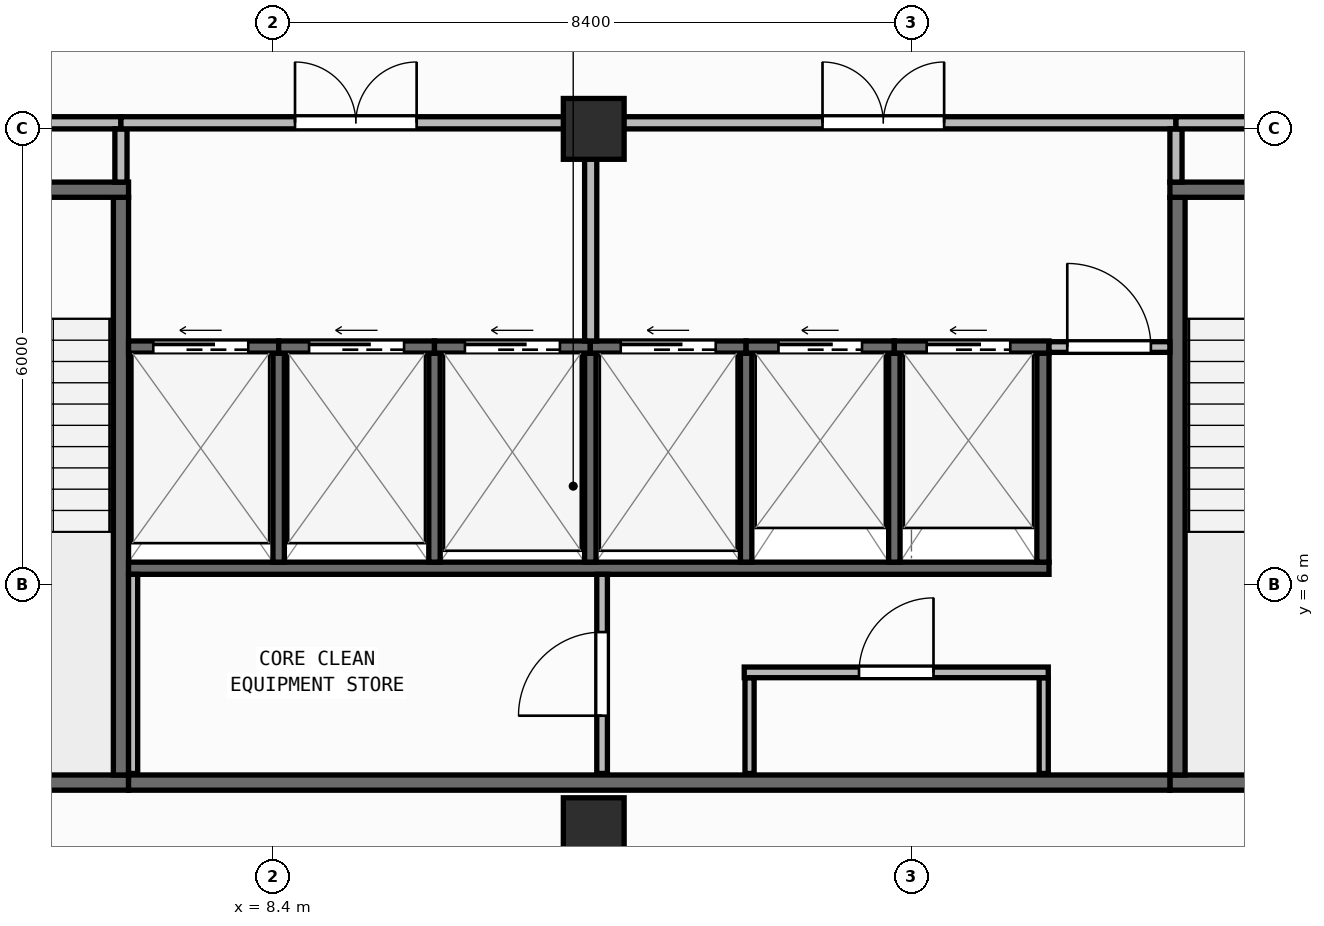
"""IFC4 building model, lengths in metres.
Left out: names, types, materials, properties, quantities, classifications, styles, units other than length and angle.
Written with IfcOpenShell. Run it as: python <this file> out.ifc"""

import sys

from ifc_helpers import new_model, si_unit, direction, frame, frame_2d, origin, origin_2d, place, context, subcontext, project, spatial, rectangle, extrude, element, fill, save


model = new_model("IFC4")
c1 = context("Model", 3, precision=1e-05, world=origin(), true_north=direction((0.0, 1.0)))
c2 = subcontext(c1, "Body", "Model", "MODEL_VIEW")
j1 = project(units=[si_unit("LENGTHUNIT", "METRE"), si_unit("PLANEANGLEUNIT", "RADIAN")], contexts=[c1])
p1 = place(None, origin())
s1 = spatial("IfcSite", under=j1, at=p1, CompositionType="ELEMENT")
p2 = place(p1, origin())
s2 = spatial("IfcBuilding", under=s1, at=p2, CompositionType="ELEMENT")
p3 = place(p2, frame((0.0, 0.0, 240.75)))
s3 = spatial("IfcBuildingStorey", under=s2, at=p3, CompositionType="ELEMENT", Elevation=240.75)
for number, where, z_axis, x_axis in (
    (1, (12.62, 2.8, 0.0), (0.0, 0.0, 1.0), (1.0, 0.0, 0.0)),
    (2, (12.62, 12.0, 0.0), (0.0, 0.0, 1.0), (1.0, 0.0, 0.0)),
):
    element("IfcColumn", number, at=place(p3, frame(where, z_axis=z_axis, x_axis=x_axis)), inside=s3, PredefinedType="COLUMN", context=c2, shape_type="SweptSolid", body=[
        extrude(rectangle(XDim=0.8, YDim=0.8, at=origin_2d()), origin(), (0.0, 0.0, 1.0), 3.95),
    ])
p4 = place(p3, frame((2.66, 0.174, 0.0), z_axis=(0.0, 0.0, 1.0), x_axis=(0.996611813627, 0.082248969229, 0.0)))
e3 = element("IfcWall", 3, at=p4, inside=s3, PredefinedType="STANDARD", context=c2, shape_type="SweptSolid", body=[
    extrude(rectangle(XDim=41.019, YDim=0.26, at=frame_2d((20.51, 0.0))), origin(), (0.0, 0.0, 1.0), 3.71),
])
p5 = place(p4, frame((19.31, 0.0, 0.9)))
e4 = element("IfcOpeningElement", 4, at=p5, cuts=e3, PredefinedType="OPENING", context=c2, shape_type="SweptSolid", body=[
    extrude(rectangle(XDim=2.4, YDim=1.65, at=frame_2d((1.2, 0.825))), frame((0.0, 0.14, 0.0), z_axis=(0.0, -1.0, 0.0), x_axis=(1.0, 0.0, 0.0)), (0.0, 0.0, 1.0), 0.28),
])
p6 = place(p3, frame((2.8, 3.4, 0.0), z_axis=(0.0, 0.0, 1.0), x_axis=(1.0, 0.0, 0.0)))
e5 = element("IfcWall", 5, at=p6, inside=s3, PredefinedType="SHEAR", context=c2, shape_type="SweptSolid", body=[
    extrude(rectangle(XDim=3.7, YDim=0.2, at=frame_2d((1.85, 0.0))), origin(), (0.0, 0.0, 1.0), 3.71),
])
p7 = place(p3, frame((6.4, 3.5, 0.0), z_axis=(0.0, 0.0, 1.0), x_axis=(0.0, 1.0, 0.0)))
e6 = element("IfcWall", 6, at=p7, inside=s3, PredefinedType="SHEAR", context=c2, shape_type="SweptSolid", body=[
    extrude(rectangle(XDim=7.6, YDim=0.2, at=frame_2d((3.8, 0.0))), origin(), (0.0, 0.0, 1.0), 3.71),
])
p8 = place(p3, frame((2.8, 11.2, 0.0), z_axis=(0.0, 0.0, 1.0), x_axis=(1.0, 0.0, 0.0)))
e7 = element("IfcWall", 7, at=p8, inside=s3, PredefinedType="SHEAR", context=c2, shape_type="SweptSolid", body=[
    extrude(rectangle(XDim=3.7, YDim=0.2, at=frame_2d((1.85, 0.0))), origin(), (0.0, 0.0, 1.0), 3.71),
])
p9 = place(p8, frame((1.2, 0.0, 0.0)))
e8 = element("IfcOpeningElement", 8, at=p9, cuts=e7, PredefinedType="OPENING", context=c2, shape_type="SweptSolid", body=[
    extrude(rectangle(XDim=1.3, YDim=2.15, at=frame_2d((0.65, 1.075))), frame((0.0, 0.11, 0.0), z_axis=(0.0, -1.0, 0.0), x_axis=(1.0, 0.0, 0.0)), (0.0, 0.0, 1.0), 0.22),
])
p10 = place(p3, frame((20.2, 3.4, 0.0), z_axis=(0.0, 0.0, 1.0), x_axis=(1.0, 0.0, 0.0)))
e9 = element("IfcWall", 9, at=p10, inside=s3, PredefinedType="SHEAR", context=c2, shape_type="SweptSolid", body=[
    extrude(rectangle(XDim=3.7, YDim=0.2, at=frame_2d((1.85, 0.0))), origin(), (0.0, 0.0, 1.0), 3.71),
])
p11 = place(p3, frame((20.3, 3.5, 0.0), z_axis=(0.0, 0.0, 1.0), x_axis=(0.0, 1.0, 0.0)))
e10 = element("IfcWall", 10, at=p11, inside=s3, PredefinedType="SHEAR", context=c2, shape_type="SweptSolid", body=[
    extrude(rectangle(XDim=7.6, YDim=0.2, at=frame_2d((3.8, 0.0))), origin(), (0.0, 0.0, 1.0), 3.71),
])
p12 = place(p3, frame((20.2, 11.2, 0.0), z_axis=(0.0, 0.0, 1.0), x_axis=(1.0, 0.0, 0.0)))
e11 = element("IfcWall", 11, at=p12, inside=s3, PredefinedType="SHEAR", context=c2, shape_type="SweptSolid", body=[
    extrude(rectangle(XDim=3.7, YDim=0.2, at=frame_2d((1.85, 0.0))), origin(), (0.0, 0.0, 1.0), 3.71),
])
p13 = place(p12, frame((1.2, 0.0, 0.0)))
e12 = element("IfcOpeningElement", 12, at=p13, cuts=e11, PredefinedType="OPENING", context=c2, shape_type="SweptSolid", body=[
    extrude(rectangle(XDim=1.3, YDim=2.15, at=frame_2d((0.65, 1.075))), frame((0.0, 0.11, 0.0), z_axis=(0.0, -1.0, 0.0), x_axis=(1.0, 0.0, 0.0)), (0.0, 0.0, 1.0), 0.22),
])
p14 = place(p3, frame((6.5, 3.4, 0.0), z_axis=(0.0, 0.0, 1.0), x_axis=(1.0, 0.0, 0.0)))
e13 = element("IfcWall", 13, at=p14, inside=s3, PredefinedType="SHEAR", context=c2, shape_type="SweptSolid", body=[
    extrude(rectangle(XDim=13.7, YDim=0.2, at=frame_2d((6.85, 0.0))), origin(), (0.0, 0.0, 1.0), 3.71),
])
p15 = place(p3, frame((6.5, 6.22, 0.0), z_axis=(0.0, 0.0, 1.0), x_axis=(1.0, 0.0, 0.0)))
e14 = element("IfcWall", 14, at=p15, inside=s3, PredefinedType="SHEAR", context=c2, shape_type="SweptSolid", body=[
    extrude(rectangle(XDim=12.11, YDim=0.16, at=frame_2d((6.055, 0.0))), origin(), (0.0, 0.0, 1.0), 3.71),
])
p16 = place(p3, frame((18.53, 6.3, 0.0), z_axis=(0.0, 0.0, 1.0), x_axis=(0.0, 1.0, 0.0)))
e15 = element("IfcWall", 15, at=p16, inside=s3, PredefinedType="SHEAR", context=c2, shape_type="SweptSolid", body=[
    extrude(rectangle(XDim=2.75, YDim=0.16, at=frame_2d((1.375, 0.0))), origin(), (0.0, 0.0, 1.0), 3.71),
])
for number, where, z_axis, x_axis in (
    (16, (8.475, 6.3, 0.0), (0.0, 0.0, 1.0), (0.0, 1.0, 0.0)),
    (17, (10.525, 6.3, 0.0), (0.0, 0.0, 1.0), (0.0, 1.0, 0.0)),
    (18, (12.575, 6.3, 0.0), (0.0, 0.0, 1.0), (0.0, 1.0, 0.0)),
    (19, (14.625, 6.3, 0.0), (0.0, 0.0, 1.0), (0.0, 1.0, 0.0)),
    (20, (16.575, 6.3, 0.0), (0.0, 0.0, 1.0), (0.0, 1.0, 0.0)),
):
    element("IfcWall", number, at=place(p3, frame(where, z_axis=z_axis, x_axis=x_axis)), inside=s3, PredefinedType="SHEAR", context=c2, shape_type="SweptSolid", body=[
        extrude(rectangle(XDim=2.75, YDim=0.15, at=frame_2d((1.375, 0.0))), origin(), (0.0, 0.0, 1.0), 3.71),
    ])
p17 = place(p3, frame((6.5, 9.13, 0.0), z_axis=(0.0, 0.0, 1.0), x_axis=(1.0, 0.0, 0.0)))
e21 = element("IfcWall", 21, at=p17, inside=s3, PredefinedType="SHEAR", context=c2, shape_type="SweptSolid", body=[
    extrude(rectangle(XDim=1.975, YDim=0.16, at=frame_2d((0.988, 0.0))), origin(), (0.0, 0.0, 1.0), 3.71),
])
p18 = place(p17, frame((0.325, 0.0, 0.0)))
e22 = element("IfcOpeningElement", 22, at=p18, cuts=e21, PredefinedType="OPENING", context=c2, shape_type="SweptSolid", body=[
    extrude(rectangle(XDim=1.25, YDim=2.15, at=frame_2d((0.625, 1.075))), frame((0.0, 0.09, 0.0), z_axis=(0.0, -1.0, 0.0), x_axis=(1.0, 0.0, 0.0)), (0.0, 0.0, 1.0), 0.18),
])
p19 = place(p3, frame((8.475, 9.13, 0.0), z_axis=(0.0, 0.0, 1.0), x_axis=(1.0, 0.0, 0.0)))
e23 = element("IfcWall", 23, at=p19, inside=s3, PredefinedType="SHEAR", context=c2, shape_type="SweptSolid", body=[
    extrude(rectangle(XDim=2.05, YDim=0.16, at=frame_2d((1.025, 0.0))), origin(), (0.0, 0.0, 1.0), 3.71),
])
p20 = place(p19, frame((0.4, 0.0, 0.0)))
e24 = element("IfcOpeningElement", 24, at=p20, cuts=e23, PredefinedType="OPENING", context=c2, shape_type="SweptSolid", body=[
    extrude(rectangle(XDim=1.25, YDim=2.15, at=frame_2d((0.625, 1.075))), frame((0.0, 0.09, 0.0), z_axis=(0.0, -1.0, 0.0), x_axis=(1.0, 0.0, 0.0)), (0.0, 0.0, 1.0), 0.18),
])
p21 = place(p3, frame((10.525, 9.13, 0.0), z_axis=(0.0, 0.0, 1.0), x_axis=(1.0, 0.0, 0.0)))
e25 = element("IfcWall", 25, at=p21, inside=s3, PredefinedType="SHEAR", context=c2, shape_type="SweptSolid", body=[
    extrude(rectangle(XDim=2.05, YDim=0.16, at=frame_2d((1.025, 0.0))), origin(), (0.0, 0.0, 1.0), 3.71),
])
p22 = place(p21, frame((0.4, 0.0, 0.0)))
e26 = element("IfcOpeningElement", 26, at=p22, cuts=e25, PredefinedType="OPENING", context=c2, shape_type="SweptSolid", body=[
    extrude(rectangle(XDim=1.25, YDim=2.15, at=frame_2d((0.625, 1.075))), frame((0.0, 0.09, 0.0), z_axis=(0.0, -1.0, 0.0), x_axis=(1.0, 0.0, 0.0)), (0.0, 0.0, 1.0), 0.18),
])
p23 = place(p3, frame((12.575, 9.13, 0.0), z_axis=(0.0, 0.0, 1.0), x_axis=(1.0, 0.0, 0.0)))
e27 = element("IfcWall", 27, at=p23, inside=s3, PredefinedType="SHEAR", context=c2, shape_type="SweptSolid", body=[
    extrude(rectangle(XDim=2.05, YDim=0.16, at=frame_2d((1.025, 0.0))), origin(), (0.0, 0.0, 1.0), 3.71),
])
p24 = place(p23, frame((0.4, 0.0, 0.0)))
e28 = element("IfcOpeningElement", 28, at=p24, cuts=e27, PredefinedType="OPENING", context=c2, shape_type="SweptSolid", body=[
    extrude(rectangle(XDim=1.25, YDim=2.15, at=frame_2d((0.625, 1.075))), frame((0.0, 0.09, 0.0), z_axis=(0.0, -1.0, 0.0), x_axis=(1.0, 0.0, 0.0)), (0.0, 0.0, 1.0), 0.18),
])
p25 = place(p3, frame((14.625, 9.13, 0.0), z_axis=(0.0, 0.0, 1.0), x_axis=(1.0, 0.0, 0.0)))
e29 = element("IfcWall", 29, at=p25, inside=s3, PredefinedType="SHEAR", context=c2, shape_type="SweptSolid", body=[
    extrude(rectangle(XDim=1.95, YDim=0.16, at=frame_2d((0.975, 0.0))), origin(), (0.0, 0.0, 1.0), 3.71),
])
p26 = place(p25, frame((0.425, 0.0, 0.0)))
e30 = element("IfcOpeningElement", 30, at=p26, cuts=e29, PredefinedType="OPENING", context=c2, shape_type="SweptSolid", body=[
    extrude(rectangle(XDim=1.1, YDim=2.15, at=frame_2d((0.55, 1.075))), frame((0.0, 0.09, 0.0), z_axis=(0.0, -1.0, 0.0), x_axis=(1.0, 0.0, 0.0)), (0.0, 0.0, 1.0), 0.18),
])
p27 = place(p3, frame((16.575, 9.13, 0.0), z_axis=(0.0, 0.0, 1.0), x_axis=(1.0, 0.0, 0.0)))
e31 = element("IfcWall", 31, at=p27, inside=s3, PredefinedType="SHEAR", context=c2, shape_type="SweptSolid", body=[
    extrude(rectangle(XDim=2.035, YDim=0.16, at=frame_2d((1.018, 0.0))), origin(), (0.0, 0.0, 1.0), 3.71),
])
p28 = place(p27, frame((0.425, 0.0, 0.0)))
e32 = element("IfcOpeningElement", 32, at=p28, cuts=e31, PredefinedType="OPENING", context=c2, shape_type="SweptSolid", body=[
    extrude(rectangle(XDim=1.1, YDim=2.15, at=frame_2d((0.55, 1.075))), frame((0.0, 0.09, 0.0), z_axis=(0.0, -1.0, 0.0), x_axis=(1.0, 0.0, 0.0)), (0.0, 0.0, 1.0), 0.18),
])
p29 = place(p3, frame((6.56, 3.52, 0.0), z_axis=(0.0, 0.0, 1.0), x_axis=(0.0, 1.0, 0.0)))
e33 = element("IfcWall", 33, at=p29, inside=s3, PredefinedType="PARTITIONING", context=c2, shape_type="SweptSolid", body=[
    extrude(rectangle(XDim=2.62, YDim=0.12, at=frame_2d((1.31, 0.0))), origin(), (0.0, 0.0, 1.0), 3.71),
])
p30 = place(p3, frame((12.73, 3.52, 0.0), z_axis=(0.0, 0.0, 1.0), x_axis=(0.0, 1.0, 0.0)))
e34 = element("IfcWall", 34, at=p30, inside=s3, PredefinedType="PARTITIONING", context=c2, shape_type="SweptSolid", body=[
    extrude(rectangle(XDim=2.62, YDim=0.14, at=frame_2d((1.31, 0.0))), origin(), (0.0, 0.0, 1.0), 3.71),
])
p31 = place(p30, frame((0.76, 0.0, 0.0)))
e35 = element("IfcOpeningElement", 35, at=p31, cuts=e34, PredefinedType="OPENING", context=c2, shape_type="SweptSolid", body=[
    extrude(rectangle(XDim=1.1, YDim=2.1, at=frame_2d((0.55, 1.05))), frame((0.0, 0.08, 0.0), z_axis=(0.0, -1.0, 0.0), x_axis=(1.0, 0.0, 0.0)), (0.0, 0.0, 1.0), 0.16),
])
for number, where, z_axis, x_axis in (
    (36, (14.67, 3.52, 0.0), (0.0, 0.0, 1.0), (0.0, 1.0, 0.0)),
    (37, (18.54, 3.52, 0.0), (0.0, 0.0, 1.0), (0.0, 1.0, 0.0)),
):
    element("IfcWall", number, at=place(p3, frame(where, z_axis=z_axis, x_axis=x_axis)), inside=s3, PredefinedType="PARTITIONING", context=c2, shape_type="SweptSolid", body=[
        extrude(rectangle(XDim=1.26, YDim=0.12, at=frame_2d((0.63, 0.0))), origin(), (0.0, 0.0, 1.0), 3.71),
    ])
p32 = place(p3, frame((14.6, 4.85, 0.0), z_axis=(0.0, 0.0, 1.0), x_axis=(1.0, 0.0, 0.0)))
e38 = element("IfcWall", 38, at=p32, inside=s3, PredefinedType="PARTITIONING", context=c2, shape_type="SweptSolid", body=[
    extrude(rectangle(XDim=4.0, YDim=0.14, at=frame_2d((2.0, 0.0))), origin(), (0.0, 0.0, 1.0), 3.71),
])
p33 = place(p32, frame((1.51, 0.0, 0.0)))
e39 = element("IfcOpeningElement", 39, at=p33, cuts=e38, PredefinedType="OPENING", context=c2, shape_type="SweptSolid", body=[
    extrude(rectangle(XDim=0.98, YDim=2.1, at=frame_2d((0.49, 1.05))), frame((0.0, 0.08, 0.0), z_axis=(0.0, -1.0, 0.0), x_axis=(1.0, 0.0, 0.0)), (0.0, 0.0, 1.0), 0.16),
])
p34 = place(p3, frame((18.61, 9.13, 0.0), z_axis=(0.0, 0.0, 1.0), x_axis=(1.0, 0.0, 0.0)))
e40 = element("IfcWall", 40, at=p34, inside=s3, PredefinedType="PARTITIONING", context=c2, shape_type="SweptSolid", body=[
    extrude(rectangle(XDim=1.59, YDim=0.14, at=frame_2d((0.795, 0.0))), origin(), (0.0, 0.0, 1.0), 3.71),
])
p35 = place(p34, frame((0.24, 0.0, 0.0)))
e41 = element("IfcOpeningElement", 41, at=p35, cuts=e40, PredefinedType="OPENING", context=c2, shape_type="SweptSolid", body=[
    extrude(rectangle(XDim=1.1, YDim=2.1, at=frame_2d((0.55, 1.05))), frame((0.0, 0.08, 0.0), z_axis=(0.0, -1.0, 0.0), x_axis=(1.0, 0.0, 0.0)), (0.0, 0.0, 1.0), 0.16),
])
p36 = place(p3, frame((2.8, 12.08, 0.0), z_axis=(0.0, 0.0, 1.0), x_axis=(1.0, 0.0, 0.0)))
e42 = element("IfcWall", 42, at=p36, inside=s3, PredefinedType="PARTITIONING", context=c2, shape_type="SweptSolid", body=[
    extrude(rectangle(XDim=3.6, YDim=0.16, at=frame_2d((1.8, 0.0))), origin(), (0.0, 0.0, 1.0), 3.157),
])
p37 = place(p36, frame((1.0, 0.0, 0.0)))
e43 = element("IfcOpeningElement", 43, at=p37, cuts=e42, PredefinedType="OPENING", context=c2, shape_type="SweptSolid", body=[
    extrude(rectangle(XDim=1.6, YDim=2.05, at=frame_2d((0.8, 1.025))), frame((0.0, 0.09, 0.0), z_axis=(0.0, -1.0, 0.0), x_axis=(1.0, 0.0, 0.0)), (0.0, 0.0, 1.0), 0.18),
])
p38 = place(p3, frame((6.4, 11.3, 0.0), z_axis=(0.0, 0.0, 1.0), x_axis=(0.0, 1.0, 0.0)))
e44 = element("IfcWall", 44, at=p38, inside=s3, PredefinedType="PARTITIONING", context=c2, shape_type="SweptSolid", body=[
    extrude(rectangle(XDim=0.7, YDim=0.16, at=frame_2d((0.35, 0.0))), origin(), (0.0, 0.0, 1.0), 3.71),
])
p39 = place(p3, frame((6.4, 12.08, 0.0), z_axis=(0.0, 0.0, 1.0), x_axis=(1.0, 0.0, 0.0)))
e45 = element("IfcWall", 45, at=p39, inside=s3, PredefinedType="PARTITIONING", context=c2, shape_type="SweptSolid", body=[
    extrude(rectangle(XDim=6.18, YDim=0.16, at=frame_2d((3.09, 0.0))), origin(), (0.0, 0.0, 1.0), 3.157),
])
p40 = place(p39, frame((2.29, 0.0, 0.0)))
e46 = element("IfcOpeningElement", 46, at=p40, cuts=e45, PredefinedType="OPENING", context=c2, shape_type="SweptSolid", body=[
    extrude(rectangle(XDim=1.6, YDim=2.05, at=frame_2d((0.8, 1.025))), frame((0.0, 0.09, 0.0), z_axis=(0.0, -1.0, 0.0), x_axis=(1.0, 0.0, 0.0)), (0.0, 0.0, 1.0), 0.18),
])
p41 = place(p3, frame((12.58, 9.21, 0.0), z_axis=(0.0, 0.0, 1.0), x_axis=(0.0, 1.0, 0.0)))
e47 = element("IfcWall", 47, at=p41, inside=s3, PredefinedType="PARTITIONING", context=c2, shape_type="SweptSolid", body=[
    extrude(rectangle(XDim=2.79, YDim=0.16, at=frame_2d((1.395, 0.0))), origin(), (0.0, 0.0, 1.0), 3.71),
])
p42 = place(p3, frame((12.58, 12.08, 0.0), z_axis=(0.0, 0.0, 1.0), x_axis=(1.0, 0.0, 0.0)))
e48 = element("IfcWall", 48, at=p42, inside=s3, PredefinedType="PARTITIONING", context=c2, shape_type="SweptSolid", body=[
    extrude(rectangle(XDim=7.7, YDim=0.16, at=frame_2d((3.85, 0.0))), origin(), (0.0, 0.0, 1.0), 3.157),
])
p43 = place(p42, frame((3.05, 0.0, 0.0)))
e49 = element("IfcOpeningElement", 49, at=p43, cuts=e48, PredefinedType="OPENING", context=c2, shape_type="SweptSolid", body=[
    extrude(rectangle(XDim=1.6, YDim=2.05, at=frame_2d((0.8, 1.025))), frame((0.0, 0.09, 0.0), z_axis=(0.0, -1.0, 0.0), x_axis=(1.0, 0.0, 0.0)), (0.0, 0.0, 1.0), 0.18),
])
p44 = place(p3, frame((20.28, 11.3, 0.0), z_axis=(0.0, 0.0, 1.0), x_axis=(0.0, 1.0, 0.0)))
e50 = element("IfcWall", 50, at=p44, inside=s3, PredefinedType="PARTITIONING", context=c2, shape_type="SweptSolid", body=[
    extrude(rectangle(XDim=0.7, YDim=0.16, at=frame_2d((0.35, 0.0))), origin(), (0.0, 0.0, 1.0), 3.71),
])
p45 = place(p3, frame((20.28, 12.08, 0.0), z_axis=(0.0, 0.0, 1.0), x_axis=(1.0, 0.0, 0.0)))
e51 = element("IfcWall", 51, at=p45, inside=s3, PredefinedType="PARTITIONING", context=c2, shape_type="SweptSolid", body=[
    extrude(rectangle(XDim=3.62, YDim=0.16, at=frame_2d((1.81, 0.0))), origin(), (0.0, 0.0, 1.0), 3.157),
])
p46 = place(p45, frame((1.01, 0.0, 0.0)))
e52 = element("IfcOpeningElement", 52, at=p46, cuts=e51, PredefinedType="OPENING", context=c2, shape_type="SweptSolid", body=[
    extrude(rectangle(XDim=1.6, YDim=2.05, at=frame_2d((0.8, 1.025))), frame((0.0, 0.09, 0.0), z_axis=(0.0, -1.0, 0.0), x_axis=(1.0, 0.0, 0.0)), (0.0, 0.0, 1.0), 0.18),
])
p47 = place(p18, origin())
e53 = element("IfcDoor", 53, at=p47, inside=s3, OperationType="SLIDING_TO_LEFT", PredefinedType="DOOR", context=c2, shape_type="SweptSolid", body=[
    extrude(rectangle(XDim=1.25, YDim=2.15, at=frame_2d((0.625, 1.075))), frame((0.0, 0.025, 0.0), z_axis=(0.0, -1.0, 0.0), x_axis=(1.0, 0.0, 0.0)), (0.0, 0.0, 1.0), 0.05),
])
fill(e22, e53)
p48 = place(p20, origin())
e54 = element("IfcDoor", 54, at=p48, inside=s3, OperationType="SLIDING_TO_LEFT", PredefinedType="DOOR", context=c2, shape_type="SweptSolid", body=[
    extrude(rectangle(XDim=1.25, YDim=2.15, at=frame_2d((0.625, 1.075))), frame((0.0, 0.025, 0.0), z_axis=(0.0, -1.0, 0.0), x_axis=(1.0, 0.0, 0.0)), (0.0, 0.0, 1.0), 0.05),
])
fill(e24, e54)
p49 = place(p22, origin())
e55 = element("IfcDoor", 55, at=p49, inside=s3, OperationType="SLIDING_TO_LEFT", PredefinedType="DOOR", context=c2, shape_type="SweptSolid", body=[
    extrude(rectangle(XDim=1.25, YDim=2.15, at=frame_2d((0.625, 1.075))), frame((0.0, 0.025, 0.0), z_axis=(0.0, -1.0, 0.0), x_axis=(1.0, 0.0, 0.0)), (0.0, 0.0, 1.0), 0.05),
])
fill(e26, e55)
p50 = place(p24, origin())
e56 = element("IfcDoor", 56, at=p50, inside=s3, OperationType="SLIDING_TO_LEFT", PredefinedType="DOOR", context=c2, shape_type="SweptSolid", body=[
    extrude(rectangle(XDim=1.25, YDim=2.15, at=frame_2d((0.625, 1.075))), frame((0.0, 0.025, 0.0), z_axis=(0.0, -1.0, 0.0), x_axis=(1.0, 0.0, 0.0)), (0.0, 0.0, 1.0), 0.05),
])
fill(e28, e56)
p51 = place(p26, origin())
e57 = element("IfcDoor", 57, at=p51, inside=s3, OperationType="SLIDING_TO_LEFT", PredefinedType="DOOR", context=c2, shape_type="SweptSolid", body=[
    extrude(rectangle(XDim=1.1, YDim=2.15, at=frame_2d((0.55, 1.075))), frame((0.0, 0.025, 0.0), z_axis=(0.0, -1.0, 0.0), x_axis=(1.0, 0.0, 0.0)), (0.0, 0.0, 1.0), 0.05),
])
fill(e30, e57)
p52 = place(p28, origin())
e58 = element("IfcDoor", 58, at=p52, inside=s3, OperationType="SLIDING_TO_LEFT", PredefinedType="DOOR", context=c2, shape_type="SweptSolid", body=[
    extrude(rectangle(XDim=1.1, YDim=2.15, at=frame_2d((0.55, 1.075))), frame((0.0, 0.025, 0.0), z_axis=(0.0, -1.0, 0.0), x_axis=(1.0, 0.0, 0.0)), (0.0, 0.0, 1.0), 0.05),
])
fill(e32, e58)
p53 = place(p31, origin())
e59 = element("IfcDoor", 59, at=p53, inside=s3, OperationType="SINGLE_SWING_LEFT", PredefinedType="DOOR", context=c2, shape_type="SweptSolid", body=[
    extrude(rectangle(XDim=1.1, YDim=2.1, at=frame_2d((0.55, 1.05))), frame((0.0, 0.025, 0.0), z_axis=(0.0, -1.0, 0.0), x_axis=(1.0, 0.0, 0.0)), (0.0, 0.0, 1.0), 0.05),
])
fill(e35, e59)
p54 = place(p33, origin())
e60 = element("IfcDoor", 60, at=p54, inside=s3, OperationType="SINGLE_SWING_RIGHT", PredefinedType="DOOR", context=c2, shape_type="SweptSolid", body=[
    extrude(rectangle(XDim=0.98, YDim=2.1, at=frame_2d((0.49, 1.05))), frame((0.0, 0.025, 0.0), z_axis=(0.0, -1.0, 0.0), x_axis=(1.0, 0.0, 0.0)), (0.0, 0.0, 1.0), 0.05),
])
fill(e39, e60)
p55 = place(p35, origin())
e61 = element("IfcDoor", 61, at=p55, inside=s3, OperationType="SINGLE_SWING_LEFT", PredefinedType="DOOR", context=c2, shape_type="SweptSolid", body=[
    extrude(rectangle(XDim=1.1, YDim=2.1, at=frame_2d((0.55, 1.05))), frame((0.0, 0.025, 0.0), z_axis=(0.0, -1.0, 0.0), x_axis=(1.0, 0.0, 0.0)), (0.0, 0.0, 1.0), 0.05),
])
fill(e41, e61)
p56 = place(p40, origin())
e62 = element("IfcDoor", 62, at=p56, inside=s3, OperationType="DOUBLE_DOOR_SINGLE_SWING", PredefinedType="DOOR", context=c2, shape_type="SweptSolid", body=[
    extrude(rectangle(XDim=1.6, YDim=2.05, at=frame_2d((0.8, 1.025))), frame((0.0, 0.025, 0.0), z_axis=(0.0, -1.0, 0.0), x_axis=(1.0, 0.0, 0.0)), (0.0, 0.0, 1.0), 0.05),
])
fill(e46, e62)
p57 = place(p43, origin())
e63 = element("IfcDoor", 63, at=p57, inside=s3, OperationType="DOUBLE_DOOR_SINGLE_SWING", PredefinedType="DOOR", context=c2, shape_type="SweptSolid", body=[
    extrude(rectangle(XDim=1.6, YDim=2.05, at=frame_2d((0.8, 1.025))), frame((0.0, 0.025, 0.0), z_axis=(0.0, -1.0, 0.0), x_axis=(1.0, 0.0, 0.0)), (0.0, 0.0, 1.0), 0.05),
])
fill(e49, e63)
save(model, sys.argv[1])
